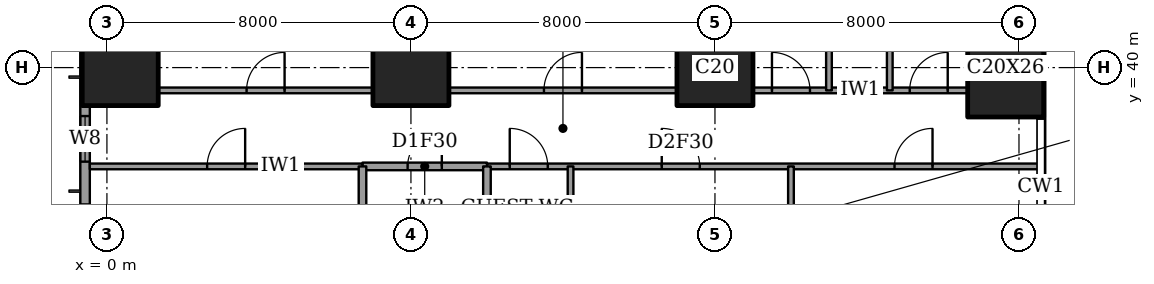
"""IFC4 building model, lengths in metres.
Left out: names, types, materials, properties, quantities, classifications, styles, units other than length and angle.
Written with IfcOpenShell. Run it as: python <this file> out.ifc"""

import sys

from ifc_helpers import new_model, si_unit, direction, frame, frame_2d, origin, origin_2d, place, context, subcontext, project, spatial, rectangle, extrude, element, fill, save


model = new_model("IFC4")
c1 = context("Model", 3, precision=1e-05, world=origin(), true_north=direction((0.0, 1.0)))
c2 = subcontext(c1, "Body", "Model", "MODEL_VIEW")
j1 = project(units=[si_unit("LENGTHUNIT", "METRE"), si_unit("PLANEANGLEUNIT", "RADIAN")], contexts=[c1])
p1 = place(None, origin())
s1 = spatial("IfcSite", under=j1, at=p1, CompositionType="ELEMENT")
p2 = place(p1, origin())
s2 = spatial("IfcBuilding", under=s1, at=p2, CompositionType="ELEMENT")
p3 = place(p2, frame((0.0, 0.0, 80.0)))
s3 = spatial("IfcBuildingStorey", under=s2, at=p3, CompositionType="ELEMENT", Elevation=80.0)
for number, where, z_axis, x_axis in (
    (1, (0.35, 40.0, 0.0), (0.0, 0.0, 1.0), (1.0, 0.0, 0.0)),
    (2, (8.0, 40.0, 0.0), (0.0, 0.0, 1.0), (1.0, 0.0, 0.0)),
    (3, (16.0, 40.0, 0.0), (0.0, 0.0, 1.0), (1.0, 0.0, 0.0)),
):
    element("IfcColumn", number, at=place(p3, frame(where, z_axis=z_axis, x_axis=x_axis)), inside=s3, PredefinedType="COLUMN", context=c2, shape_type="SweptSolid", body=[
        extrude(rectangle(XDim=2.0, YDim=2.0, at=origin_2d()), origin(), (0.0, 0.0, 1.0), 3.6),
    ])
p4 = place(p3, frame((23.65, 40.0, 0.0), z_axis=(0.0, 0.0, 1.0), x_axis=(1.0, 0.0, 0.0)))
e4 = element("IfcColumn", 4, at=p4, inside=s3, PredefinedType="COLUMN", context=c2, shape_type="SweptSolid", body=[
    extrude(rectangle(XDim=2.0, YDim=2.6, at=origin_2d()), origin(), (0.0, 0.0, 1.0), 3.6),
])
p5 = place(p3, frame((-0.575, 44.825, 0.0), z_axis=(0.0, 0.0, 1.0), x_axis=(0.0, -1.0, 0.0)))
e5 = element("IfcWall", 5, at=p5, inside=s3, PredefinedType="SOLIDWALL", context=c2, shape_type="SweptSolid", body=[
    extrude(rectangle(XDim=41.65, YDim=0.25, at=frame_2d((20.825, 0.0))), origin(), (0.0, 0.0, 1.0), 3.6),
])
p6 = place(p5, frame((0.775, 0.0, 0.6)))
e6 = element("IfcOpeningElement", 6, at=p6, cuts=e5, PredefinedType="OPENING", context=c2, shape_type="SweptSolid", body=[
    extrude(rectangle(XDim=2.4, YDim=2.0, at=frame_2d((1.2, 1.0))), frame((0.0, 0.135, 0.0), z_axis=(0.0, -1.0, 0.0), x_axis=(1.0, 0.0, 0.0)), (0.0, 0.0, 1.0), 0.27),
])
p7 = place(p5, frame((6.1, 0.0, 0.6)))
e7 = element("IfcOpeningElement", 7, at=p7, cuts=e5, PredefinedType="OPENING", context=c2, shape_type="SweptSolid", body=[
    extrude(rectangle(XDim=1.2, YDim=2.0, at=frame_2d((0.6, 1.0))), frame((0.0, 0.135, 0.0), z_axis=(0.0, -1.0, 0.0), x_axis=(1.0, 0.0, 0.0)), (0.0, 0.0, 1.0), 0.27),
])
p8 = place(p5, frame((8.425, 0.0, 0.6)))
e8 = element("IfcOpeningElement", 8, at=p8, cuts=e5, PredefinedType="OPENING", context=c2, shape_type="SweptSolid", body=[
    extrude(rectangle(XDim=2.4, YDim=2.0, at=frame_2d((1.2, 1.0))), frame((0.0, 0.135, 0.0), z_axis=(0.0, -1.0, 0.0), x_axis=(1.0, 0.0, 0.0)), (0.0, 0.0, 1.0), 0.27),
])
p9 = place(p5, frame((15.625, 0.0, 0.6)))
e9 = element("IfcOpeningElement", 9, at=p9, cuts=e5, PredefinedType="OPENING", context=c2, shape_type="SweptSolid", body=[
    extrude(rectangle(XDim=2.4, YDim=2.0, at=frame_2d((1.2, 1.0))), frame((0.0, 0.135, 0.0), z_axis=(0.0, -1.0, 0.0), x_axis=(1.0, 0.0, 0.0)), (0.0, 0.0, 1.0), 0.27),
])
p10 = place(p5, frame((23.625, 0.0, 0.6)))
e10 = element("IfcOpeningElement", 10, at=p10, cuts=e5, PredefinedType="OPENING", context=c2, shape_type="SweptSolid", body=[
    extrude(rectangle(XDim=2.4, YDim=2.0, at=frame_2d((1.2, 1.0))), frame((0.0, 0.135, 0.0), z_axis=(0.0, -1.0, 0.0), x_axis=(1.0, 0.0, 0.0)), (0.0, 0.0, 1.0), 0.27),
])
p11 = place(p5, frame((30.825, 0.0, 0.6)))
e11 = element("IfcOpeningElement", 11, at=p11, cuts=e5, PredefinedType="OPENING", context=c2, shape_type="SweptSolid", body=[
    extrude(rectangle(XDim=2.4, YDim=2.0, at=frame_2d((1.2, 1.0))), frame((0.0, 0.135, 0.0), z_axis=(0.0, -1.0, 0.0), x_axis=(1.0, 0.0, 0.0)), (0.0, 0.0, 1.0), 0.27),
])
p12 = place(p5, frame((34.5, 0.0, 0.6)))
e12 = element("IfcOpeningElement", 12, at=p12, cuts=e5, PredefinedType="OPENING", context=c2, shape_type="SweptSolid", body=[
    extrude(rectangle(XDim=1.2, YDim=2.0, at=frame_2d((0.6, 1.0))), frame((0.0, 0.135, 0.0), z_axis=(0.0, -1.0, 0.0), x_axis=(1.0, 0.0, 0.0)), (0.0, 0.0, 1.0), 0.27),
])
p13 = place(p5, frame((38.475, 0.0, 0.6)))
e13 = element("IfcOpeningElement", 13, at=p13, cuts=e5, PredefinedType="OPENING", context=c2, shape_type="SweptSolid", body=[
    extrude(rectangle(XDim=2.4, YDim=2.0, at=frame_2d((1.2, 1.0))), frame((0.0, 0.135, 0.0), z_axis=(0.0, -1.0, 0.0), x_axis=(1.0, 0.0, 0.0)), (0.0, 0.0, 1.0), 0.27),
])
p14 = place(p3, frame((6.725, 37.4, 0.0), z_axis=(0.0, 0.0, 1.0), x_axis=(1.0, 0.0, 0.0)))
e14 = element("IfcWall", 14, at=p14, inside=s3, PredefinedType="PARTITIONING", context=c2, shape_type="SweptSolid", body=[
    extrude(rectangle(XDim=3.275, YDim=0.2, at=frame_2d((1.637, 0.0))), origin(), (0.0, 0.0, 1.0), 3.35),
])
p15 = place(p14, frame((1.188, 0.0, 0.0)))
e15 = element("IfcOpeningElement", 15, at=p15, cuts=e14, PredefinedType="OPENING", context=c2, shape_type="SweptSolid", body=[
    extrude(rectangle(XDim=0.9, YDim=2.1, at=frame_2d((0.45, 1.05))), frame((0.0, 0.11, 0.0), z_axis=(0.0, -1.0, 0.0), x_axis=(1.0, 0.0, 0.0)), (0.0, 0.0, 1.0), 0.22),
])
p16 = place(p3, frame((-0.45, 37.4, 0.0), z_axis=(0.0, 0.0, 1.0), x_axis=(1.0, 0.0, 0.0)))
e16 = element("IfcWall", 16, at=p16, inside=s3, PredefinedType="PARTITIONING", context=c2, shape_type="SweptSolid", body=[
    extrude(rectangle(XDim=7.175, YDim=0.15, at=frame_2d((3.587, 0.0))), origin(), (0.0, 0.0, 1.0), 3.35),
])
p17 = place(p16, frame((3.087, 0.0, 0.0)))
e17 = element("IfcOpeningElement", 17, at=p17, cuts=e16, PredefinedType="OPENING", context=c2, shape_type="SweptSolid", body=[
    extrude(rectangle(XDim=1.0, YDim=2.1, at=frame_2d((0.5, 1.05))), frame((0.0, 0.085, 0.0), z_axis=(0.0, -1.0, 0.0), x_axis=(1.0, 0.0, 0.0)), (0.0, 0.0, 1.0), 0.17),
])
p18 = place(p3, frame((10.0, 37.4, 0.0), z_axis=(0.0, 0.0, 1.0), x_axis=(1.0, 0.0, 0.0)))
e18 = element("IfcWall", 18, at=p18, inside=s3, PredefinedType="PARTITIONING", context=c2, shape_type="SweptSolid", body=[
    extrude(rectangle(XDim=14.561, YDim=0.15, at=frame_2d((7.281, 0.0))), origin(), (0.0, 0.0, 1.0), 3.35),
])
p19 = place(p18, frame((0.6, 0.0, 0.0)))
e19 = element("IfcOpeningElement", 19, at=p19, cuts=e18, PredefinedType="OPENING", context=c2, shape_type="SweptSolid", body=[
    extrude(rectangle(XDim=1.0, YDim=2.1, at=frame_2d((0.5, 1.05))), frame((0.0, 0.085, 0.0), z_axis=(0.0, -1.0, 0.0), x_axis=(1.0, 0.0, 0.0)), (0.0, 0.0, 1.0), 0.17),
])
p20 = place(p18, frame((4.6, 0.0, 0.0)))
e20 = element("IfcOpeningElement", 20, at=p20, cuts=e18, PredefinedType="OPENING", context=c2, shape_type="SweptSolid", body=[
    extrude(rectangle(XDim=1.0, YDim=2.1, at=frame_2d((0.5, 1.05))), frame((0.0, 0.085, 0.0), z_axis=(0.0, -1.0, 0.0), x_axis=(1.0, 0.0, 0.0)), (0.0, 0.0, 1.0), 0.17),
])
p21 = place(p18, frame((10.725, 0.0, 0.0)))
e21 = element("IfcOpeningElement", 21, at=p21, cuts=e18, PredefinedType="OPENING", context=c2, shape_type="SweptSolid", body=[
    extrude(rectangle(XDim=1.0, YDim=2.1, at=frame_2d((0.5, 1.05))), frame((0.0, 0.085, 0.0), z_axis=(0.0, -1.0, 0.0), x_axis=(1.0, 0.0, 0.0)), (0.0, 0.0, 1.0), 0.17),
])
p22 = place(p3, frame((1.35, 39.4, 0.0), z_axis=(0.0, 0.0, 1.0), x_axis=(1.0, 0.0, 0.0)))
e22 = element("IfcWall", 22, at=p22, inside=s3, PredefinedType="PARTITIONING", context=c2, shape_type="SweptSolid", body=[
    extrude(rectangle(XDim=5.65, YDim=0.15, at=frame_2d((2.825, 0.0))), origin(), (0.0, 0.0, 1.0), 3.35),
])
p23 = place(p22, frame((2.325, 0.0, 0.0)))
e23 = element("IfcOpeningElement", 23, at=p23, cuts=e22, PredefinedType="OPENING", context=c2, shape_type="SweptSolid", body=[
    extrude(rectangle(XDim=1.0, YDim=2.1, at=frame_2d((0.5, 1.05))), frame((0.0, 0.085, 0.0), z_axis=(0.0, -1.0, 0.0), x_axis=(1.0, 0.0, 0.0)), (0.0, 0.0, 1.0), 0.17),
])
p24 = place(p3, frame((9.0, 39.4, 0.0), z_axis=(0.0, 0.0, 1.0), x_axis=(1.0, 0.0, 0.0)))
e24 = element("IfcWall", 24, at=p24, inside=s3, PredefinedType="PARTITIONING", context=c2, shape_type="SweptSolid", body=[
    extrude(rectangle(XDim=6.0, YDim=0.15, at=frame_2d((3.0, 0.0))), origin(), (0.0, 0.0, 1.0), 3.35),
])
p25 = place(p24, frame((2.5, 0.0, 0.0)))
e25 = element("IfcOpeningElement", 25, at=p25, cuts=e24, PredefinedType="OPENING", context=c2, shape_type="SweptSolid", body=[
    extrude(rectangle(XDim=1.0, YDim=2.1, at=frame_2d((0.5, 1.05))), frame((0.0, 0.085, 0.0), z_axis=(0.0, -1.0, 0.0), x_axis=(1.0, 0.0, 0.0)), (0.0, 0.0, 1.0), 0.17),
])
p26 = place(p3, frame((17.0, 39.4, 0.0), z_axis=(0.0, 0.0, 1.0), x_axis=(1.0, 0.0, 0.0)))
e26 = element("IfcWall", 26, at=p26, inside=s3, PredefinedType="PARTITIONING", context=c2, shape_type="SweptSolid", body=[
    extrude(rectangle(XDim=5.65, YDim=0.15, at=frame_2d((2.825, 0.0))), origin(), (0.0, 0.0, 1.0), 3.35),
])
p27 = place(p26, frame((0.5, 0.0, 0.0)))
e27 = element("IfcOpeningElement", 27, at=p27, cuts=e26, PredefinedType="OPENING", context=c2, shape_type="SweptSolid", body=[
    extrude(rectangle(XDim=1.0, YDim=2.1, at=frame_2d((0.5, 1.05))), frame((0.0, 0.085, 0.0), z_axis=(0.0, -1.0, 0.0), x_axis=(1.0, 0.0, 0.0)), (0.0, 0.0, 1.0), 0.17),
])
p28 = place(p26, frame((4.125, 0.0, 0.0)))
e28 = element("IfcOpeningElement", 28, at=p28, cuts=e26, PredefinedType="OPENING", context=c2, shape_type="SweptSolid", body=[
    extrude(rectangle(XDim=1.0, YDim=2.1, at=frame_2d((0.5, 1.05))), frame((0.0, 0.085, 0.0), z_axis=(0.0, -1.0, 0.0), x_axis=(1.0, 0.0, 0.0)), (0.0, 0.0, 1.0), 0.17),
])
p29 = place(p3, frame((6.725, 33.2, 0.0), z_axis=(0.0, 0.0, 1.0), x_axis=(0.0, 1.0, 0.0)))
e29 = element("IfcWall", 29, at=p29, inside=s3, PredefinedType="PARTITIONING", context=c2, shape_type="SweptSolid", body=[
    extrude(rectangle(XDim=4.2, YDim=0.2, at=frame_2d((2.1, 0.0))), origin(), (0.0, 0.0, 1.0), 3.35),
])
p30 = place(p3, frame((10.0, 31.0, 0.0), z_axis=(0.0, 0.0, 1.0), x_axis=(0.0, 1.0, 0.0)))
e30 = element("IfcWall", 30, at=p30, inside=s3, PredefinedType="PARTITIONING", context=c2, shape_type="SweptSolid", body=[
    extrude(rectangle(XDim=6.4, YDim=0.2, at=frame_2d((3.2, 0.0))), origin(), (0.0, 0.0, 1.0), 3.35),
])
p31 = place(p3, frame((12.2, 30.675, 0.0), z_axis=(0.0, 0.0, 1.0), x_axis=(0.0, 1.0, 0.0)))
e31 = element("IfcWall", 31, at=p31, inside=s3, PredefinedType="PARTITIONING", context=c2, shape_type="SweptSolid", body=[
    extrude(rectangle(XDim=6.725, YDim=0.15, at=frame_2d((3.362, 0.0))), origin(), (0.0, 0.0, 1.0), 3.35),
])
p32 = place(p3, frame((18.0, 28.0, 0.0), z_axis=(0.0, 0.0, 1.0), x_axis=(0.0, 1.0, 0.0)))
e32 = element("IfcWall", 32, at=p32, inside=s3, PredefinedType="PARTITIONING", context=c2, shape_type="SweptSolid", body=[
    extrude(rectangle(XDim=9.4, YDim=0.15, at=frame_2d((4.7, 0.0))), origin(), (0.0, 0.0, 1.0), 3.35),
])
p33 = place(p32, frame((0.887, 0.0, 0.0)))
e33 = element("IfcOpeningElement", 33, at=p33, cuts=e32, PredefinedType="OPENING", context=c2, shape_type="SweptSolid", body=[
    extrude(rectangle(XDim=0.9, YDim=2.1, at=frame_2d((0.45, 1.05))), frame((0.0, 0.085, 0.0), z_axis=(0.0, -1.0, 0.0), x_axis=(1.0, 0.0, 0.0)), (0.0, 0.0, 1.0), 0.17),
])
p34 = place(p3, frame((19.0, 39.4, 0.0), z_axis=(0.0, 0.0, 1.0), x_axis=(0.0, 1.0, 0.0)))
e34 = element("IfcWall", 34, at=p34, inside=s3, PredefinedType="PARTITIONING", context=c2, shape_type="SweptSolid", body=[
    extrude(rectangle(XDim=9.05, YDim=0.15, at=frame_2d((4.525, 0.0))), origin(), (0.0, 0.0, 1.0), 3.35),
])
p35 = place(p3, frame((20.6, 39.4, 0.0), z_axis=(0.0, 0.0, 1.0), x_axis=(0.0, 1.0, 0.0)))
e35 = element("IfcWall", 35, at=p35, inside=s3, PredefinedType="PARTITIONING", context=c2, shape_type="SweptSolid", body=[
    extrude(rectangle(XDim=9.05, YDim=0.15, at=frame_2d((4.525, 0.0))), origin(), (0.0, 0.0, 1.0), 3.35),
])
p36 = place(p35, frame((4.075, 0.0, 0.0)))
e36 = element("IfcOpeningElement", 36, at=p36, cuts=e35, PredefinedType="OPENING", context=c2, shape_type="SweptSolid", body=[
    extrude(rectangle(XDim=0.9, YDim=2.1, at=frame_2d((0.45, 1.05))), frame((0.0, 0.085, 0.0), z_axis=(0.0, -1.0, 0.0), x_axis=(1.0, 0.0, 0.0)), (0.0, 0.0, 1.0), 0.17),
])
p37 = place(p7, origin())
e37 = element("IfcWindow", 37, at=p37, inside=s3, PartitioningType="SINGLE_PANEL", PredefinedType="WINDOW", context=c2, shape_type="SweptSolid", body=[
    extrude(rectangle(XDim=1.2, YDim=2.0, at=frame_2d((0.6, 1.0))), frame((0.0, 0.03, 0.0), z_axis=(0.0, -1.0, 0.0), x_axis=(1.0, 0.0, 0.0)), (0.0, 0.0, 1.0), 0.06),
])
fill(e7, e37)
p38 = place(p23, origin())
e38 = element("IfcDoor", 38, at=p38, inside=s3, OperationType="SINGLE_SWING_LEFT", PredefinedType="DOOR", context=c2, shape_type="SweptSolid", body=[
    extrude(rectangle(XDim=1.0, YDim=2.1, at=frame_2d((0.5, 1.05))), frame((0.0, 0.025, 0.0), z_axis=(0.0, -1.0, 0.0), x_axis=(1.0, 0.0, 0.0)), (0.0, 0.0, 1.0), 0.05),
])
fill(e23, e38)
p39 = place(p25, origin())
e39 = element("IfcDoor", 39, at=p39, inside=s3, OperationType="SINGLE_SWING_LEFT", PredefinedType="DOOR", context=c2, shape_type="SweptSolid", body=[
    extrude(rectangle(XDim=1.0, YDim=2.1, at=frame_2d((0.5, 1.05))), frame((0.0, 0.025, 0.0), z_axis=(0.0, -1.0, 0.0), x_axis=(1.0, 0.0, 0.0)), (0.0, 0.0, 1.0), 0.05),
])
fill(e25, e39)
p40 = place(p27, origin())
e40 = element("IfcDoor", 40, at=p40, inside=s3, OperationType="SINGLE_SWING_RIGHT", PredefinedType="DOOR", context=c2, shape_type="SweptSolid", body=[
    extrude(rectangle(XDim=1.0, YDim=2.1, at=frame_2d((0.5, 1.05))), frame((0.0, 0.025, 0.0), z_axis=(0.0, -1.0, 0.0), x_axis=(1.0, 0.0, 0.0)), (0.0, 0.0, 1.0), 0.05),
])
fill(e27, e40)
p41 = place(p28, origin())
e41 = element("IfcDoor", 41, at=p41, inside=s3, OperationType="SINGLE_SWING_LEFT", PredefinedType="DOOR", context=c2, shape_type="SweptSolid", body=[
    extrude(rectangle(XDim=1.0, YDim=2.1, at=frame_2d((0.5, 1.05))), frame((0.0, 0.025, 0.0), z_axis=(0.0, -1.0, 0.0), x_axis=(1.0, 0.0, 0.0)), (0.0, 0.0, 1.0), 0.05),
])
fill(e28, e41)
p42 = place(p19, origin())
e42 = element("IfcDoor", 42, at=p42, inside=s3, OperationType="SINGLE_SWING_RIGHT", PredefinedType="DOOR", context=c2, shape_type="SweptSolid", body=[
    extrude(rectangle(XDim=1.0, YDim=2.1, at=frame_2d((0.5, 1.05))), frame((0.0, 0.025, 0.0), z_axis=(0.0, -1.0, 0.0), x_axis=(1.0, 0.0, 0.0)), (0.0, 0.0, 1.0), 0.05),
])
fill(e19, e42)
p43 = place(p17, origin())
e43 = element("IfcDoor", 43, at=p43, inside=s3, OperationType="SINGLE_SWING_LEFT", PredefinedType="DOOR", context=c2, shape_type="SweptSolid", body=[
    extrude(rectangle(XDim=1.0, YDim=2.1, at=frame_2d((0.5, 1.05))), frame((0.0, 0.025, 0.0), z_axis=(0.0, -1.0, 0.0), x_axis=(1.0, 0.0, 0.0)), (0.0, 0.0, 1.0), 0.05),
])
fill(e17, e43)
p44 = place(p15, origin())
e44 = element("IfcDoor", 44, at=p44, inside=s3, OperationType="SINGLE_SWING_LEFT", PredefinedType="DOOR", context=c2, shape_type="SweptSolid", body=[
    extrude(rectangle(XDim=0.9, YDim=2.1, at=frame_2d((0.45, 1.05))), frame((0.0, 0.025, 0.0), z_axis=(0.0, -1.0, 0.0), x_axis=(1.0, 0.0, 0.0)), (0.0, 0.0, 1.0), 0.05),
])
fill(e15, e44)
p45 = place(p20, origin())
e45 = element("IfcDoor", 45, at=p45, inside=s3, OperationType="SINGLE_SWING_RIGHT", PredefinedType="DOOR", context=c2, shape_type="SweptSolid", body=[
    extrude(rectangle(XDim=1.0, YDim=2.1, at=frame_2d((0.5, 1.05))), frame((0.0, 0.025, 0.0), z_axis=(0.0, -1.0, 0.0), x_axis=(1.0, 0.0, 0.0)), (0.0, 0.0, 1.0), 0.05),
])
fill(e20, e45)
p46 = place(p21, origin())
e46 = element("IfcDoor", 46, at=p46, inside=s3, OperationType="SINGLE_SWING_LEFT", PredefinedType="DOOR", context=c2, shape_type="SweptSolid", body=[
    extrude(rectangle(XDim=1.0, YDim=2.1, at=frame_2d((0.5, 1.05))), frame((0.0, 0.025, 0.0), z_axis=(0.0, -1.0, 0.0), x_axis=(1.0, 0.0, 0.0)), (0.0, 0.0, 1.0), 0.05),
])
fill(e21, e46)
save(model, sys.argv[1])
